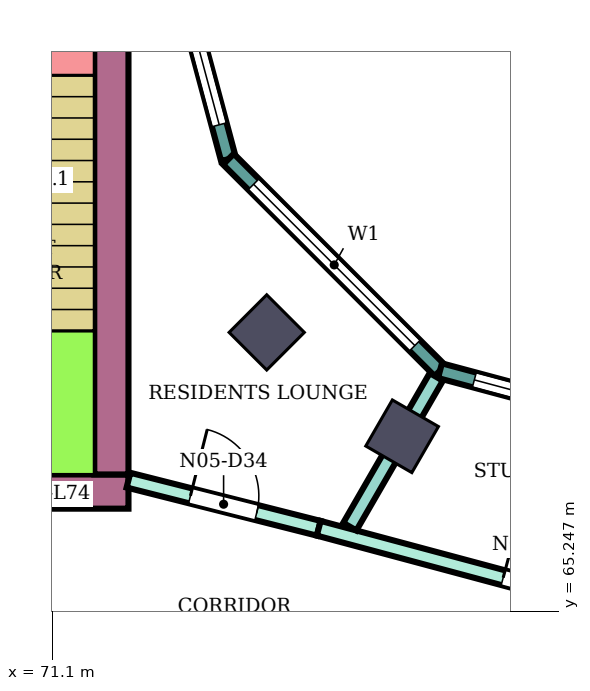
"""IFC4 building model, lengths in metres.
Left out: names, types, materials, properties, quantities, classifications, styles, units other than length and angle.
Written with IfcOpenShell. Run it as: python <this file> out.ifc"""

import sys

from ifc_helpers import new_model, si_unit, direction, frame, frame_2d, origin, origin_2d, place, context, subcontext, project, spatial, rectangle, extrude, element, fill, save


model = new_model("IFC4")
c1 = context("Model", 3, precision=1e-05, world=origin(), true_north=direction((0.0, 1.0)))
c2 = subcontext(c1, "Body", "Model", "MODEL_VIEW")
j1 = project(units=[si_unit("LENGTHUNIT", "METRE"), si_unit("PLANEANGLEUNIT", "RADIAN")], contexts=[c1])
p1 = place(None, origin())
s1 = spatial("IfcSite", under=j1, at=p1, CompositionType="ELEMENT")
p2 = place(p1, origin())
s2 = spatial("IfcBuilding", under=s1, at=p2, CompositionType="ELEMENT")
p3 = place(p2, frame((0.0, 0.0, 323.7)))
s3 = spatial("IfcBuildingStorey", under=s2, at=p3, CompositionType="ELEMENT", Elevation=323.7)
for number, where, z_axis, x_axis in (
    (1, (73.919, 68.919, 0.0), (0.0, 0.0, 1.0), (-0.707, -0.707, 0.0)),
    (2, (75.7, 67.552, 0.0), (0.0, 0.0, 1.0), (-0.5, -0.866, 0.0)),
):
    element("IfcColumn", number, at=place(p3, frame(where, z_axis=z_axis, x_axis=x_axis)), inside=s3, PredefinedType="COLUMN", context=c2, shape_type="SweptSolid", body=[
        extrude(rectangle(XDim=0.7, YDim=0.7, at=origin_2d()), origin(), (0.0, 0.0, 1.0), 4.4),
    ])
p4 = place(p3, frame((72.1, 66.825, 0.0), z_axis=(0.0, 0.0, 1.0), x_axis=(-1.0, 0.0, 0.0)))
e3 = element("IfcWall", 3, at=p4, inside=s3, PredefinedType="SHEAR", context=c2, shape_type="SweptSolid", body=[
    extrude(rectangle(XDim=10.0, YDim=0.45, at=frame_2d((5.0, 0.0))), origin(), (0.0, 0.0, 1.0), 4.05),
])
p5 = place(p4, frame((4.2, 0.0, 0.0)))
e4 = element("IfcOpeningElement", 4, at=p5, cuts=e3, PredefinedType="OPENING", context=c2, shape_type="SweptSolid", body=[
    extrude(rectangle(XDim=2.4, YDim=2.4, at=frame_2d((1.2, 1.2))), frame((0.0, 0.235, 0.0), z_axis=(0.0, -1.0, 0.0), x_axis=(1.0, 0.0, 0.0)), (0.0, 0.0, 1.0), 0.47),
])
p6 = place(p3, frame((71.875, 75.0, 0.0), z_axis=(0.0, 0.0, 1.0), x_axis=(0.0, -1.0, 0.0)))
e5 = element("IfcWall", 5, at=p6, inside=s3, PredefinedType="SHEAR", context=c2, shape_type="SweptSolid", body=[
    extrude(rectangle(XDim=7.95, YDim=0.45, at=frame_2d((3.975, 0.0))), origin(), (0.0, 0.0, 1.0), 4.05),
])
p7 = place(p3, frame((72.396, 75.0, 0.0), z_axis=(0.0, 0.0, 1.0), x_axis=(0.258789828301, -0.965933654434, 0.0)))
e6 = element("IfcWall", 6, at=p7, inside=s3, PredefinedType="NOTDEFINED", context=c2, shape_type="SweptSolid", body=[
    extrude(rectangle(XDim=3.936, YDim=0.2, at=frame_2d((1.968, 0.0))), origin(), (0.0, 0.0, 1.0), 4.4),
])
p8 = place(p7, frame((0.468, 0.0, 0.9)))
e7 = element("IfcOpeningElement", 7, at=p8, cuts=e6, PredefinedType="OPENING", context=c2, shape_type="SweptSolid", body=[
    extrude(rectangle(XDim=3.0, YDim=2.3, at=frame_2d((1.5, 1.15))), frame((0.0, 0.11, 0.0), z_axis=(0.0, -1.0, 0.0), x_axis=(1.0, 0.0, 0.0)), (0.0, 0.0, 1.0), 0.22),
])
p9 = place(p3, frame((73.415, 71.198, 0.0), z_axis=(0.0, 0.0, 1.0), x_axis=(0.707106781187, -0.707106781187, 0.0)))
e8 = element("IfcWall", 8, at=p9, inside=s3, PredefinedType="NOTDEFINED", context=c2, shape_type="SweptSolid", body=[
    extrude(rectangle(XDim=3.936, YDim=0.2, at=frame_2d((1.968, 0.0))), origin(), (0.0, 0.0, 1.0), 4.4),
])
p10 = place(p9, frame((0.468, 0.0, 0.9)))
e9 = element("IfcOpeningElement", 9, at=p10, cuts=e8, PredefinedType="OPENING", context=c2, shape_type="SweptSolid", body=[
    extrude(rectangle(XDim=3.0, YDim=2.3, at=frame_2d((1.5, 1.15))), frame((0.0, 0.11, 0.0), z_axis=(0.0, -1.0, 0.0), x_axis=(1.0, 0.0, 0.0)), (0.0, 0.0, 1.0), 0.22),
])
p11 = place(p3, frame((76.198, 68.415, 0.0), z_axis=(0.0, 0.0, 1.0), x_axis=(0.965933654434, -0.258789828301, 0.0)))
e10 = element("IfcWall", 10, at=p11, inside=s3, PredefinedType="NOTDEFINED", context=c2, shape_type="SweptSolid", body=[
    extrude(rectangle(XDim=3.936, YDim=0.2, at=frame_2d((1.968, 0.0))), origin(), (0.0, 0.0, 1.0), 4.4),
])
p12 = place(p11, frame((0.468, 0.0, 0.9)))
e11 = element("IfcOpeningElement", 11, at=p12, cuts=e10, PredefinedType="OPENING", context=c2, shape_type="SweptSolid", body=[
    extrude(rectangle(XDim=3.0, YDim=2.3, at=frame_2d((1.5, 1.15))), frame((0.0, 0.11, 0.0), z_axis=(0.0, -1.0, 0.0), x_axis=(1.0, 0.0, 0.0)), (0.0, 0.0, 1.0), 0.22),
])
p13 = place(p3, frame((68.201, 65.28, 0.0), z_axis=(0.0, 0.0, 1.0), x_axis=(0.969421088032, -0.245403247897, 0.0)))
e12 = element("IfcWall", 12, at=p13, inside=s3, PredefinedType="PARTITIONING", context=c2, shape_type="SweptSolid", body=[
    extrude(rectangle(XDim=5.927, YDim=0.2, at=frame_2d((2.964, 0.0))), origin(), (0.0, 0.0, 1.0), 3.95),
])
p14 = place(p3, frame((72.1, 66.975, 0.0), z_axis=(0.0, 0.0, 1.0), x_axis=(0.969471314457, -0.245204752086, 0.0)))
e13 = element("IfcWall", 13, at=p14, inside=s3, PredefinedType="PARTITIONING", context=c2, shape_type="SweptSolid", body=[
    extrude(rectangle(XDim=2.582, YDim=0.2, at=frame_2d((1.291, 0.0))), origin(), (0.0, 0.0, 1.0), 3.95),
])
p15 = place(p14, frame((0.841, 0.0, 0.0)))
e14 = element("IfcOpeningElement", 14, at=p15, cuts=e13, PredefinedType="OPENING", context=c2, shape_type="SweptSolid", body=[
    extrude(rectangle(XDim=0.9, YDim=2.1, at=frame_2d((0.45, 1.05))), frame((0.0, 0.11, 0.0), z_axis=(0.0, -1.0, 0.0), x_axis=(1.0, 0.0, 0.0)), (0.0, 0.0, 1.0), 0.22),
])
p16 = place(p3, frame((74.603, 66.342, 0.0), z_axis=(0.0, 0.0, 1.0), x_axis=(0.965920893652, -0.258837453254, 0.0)))
e15 = element("IfcWall", 15, at=p16, inside=s3, PredefinedType="PARTITIONING", context=c2, shape_type="SweptSolid", body=[
    extrude(rectangle(XDim=5.458, YDim=0.2, at=frame_2d((2.729, 0.0))), origin(), (0.0, 0.0, 1.0), 3.95),
])
p17 = place(p16, frame((2.512, 0.0, 0.0)))
e16 = element("IfcOpeningElement", 16, at=p17, cuts=e15, PredefinedType="OPENING", context=c2, shape_type="SweptSolid", body=[
    extrude(rectangle(XDim=0.9, YDim=2.1, at=frame_2d((0.45, 1.05))), frame((0.0, 0.11, 0.0), z_axis=(0.0, -1.0, 0.0), x_axis=(1.0, 0.0, 0.0)), (0.0, 0.0, 1.0), 0.22),
])
p18 = place(p3, frame((75.012, 66.363, 0.0), z_axis=(0.0, 0.0, 1.0), x_axis=(0.500143511652, 0.865942531438, 0.0)))
e17 = element("IfcWall", 17, at=p18, inside=s3, PredefinedType="PARTITIONING", context=c2, shape_type="SweptSolid", body=[
    extrude(rectangle(XDim=2.275, YDim=0.2, at=frame_2d((1.138, 0.0))), origin(), (0.0, 0.0, 1.0), 2.45),
])
p19 = place(p8, origin())
e18 = element("IfcWindow", 18, at=p19, inside=s3, PartitioningType="SINGLE_PANEL", PredefinedType="WINDOW", context=c2, shape_type="SweptSolid", body=[
    extrude(rectangle(XDim=3.0, YDim=2.3, at=frame_2d((1.5, 1.15))), frame((0.0, 0.03, 0.0), z_axis=(0.0, -1.0, 0.0), x_axis=(1.0, 0.0, 0.0)), (0.0, 0.0, 1.0), 0.06),
])
fill(e7, e18)
p20 = place(p10, origin())
e19 = element("IfcWindow", 19, at=p20, inside=s3, PartitioningType="SINGLE_PANEL", PredefinedType="WINDOW", context=c2, shape_type="SweptSolid", body=[
    extrude(rectangle(XDim=3.0, YDim=2.3, at=frame_2d((1.5, 1.15))), frame((0.0, 0.03, 0.0), z_axis=(0.0, -1.0, 0.0), x_axis=(1.0, 0.0, 0.0)), (0.0, 0.0, 1.0), 0.06),
])
fill(e9, e19)
p21 = place(p12, origin())
e20 = element("IfcWindow", 20, at=p21, inside=s3, PartitioningType="SINGLE_PANEL", PredefinedType="WINDOW", context=c2, shape_type="SweptSolid", body=[
    extrude(rectangle(XDim=3.0, YDim=2.3, at=frame_2d((1.5, 1.15))), frame((0.0, 0.03, 0.0), z_axis=(0.0, -1.0, 0.0), x_axis=(1.0, 0.0, 0.0)), (0.0, 0.0, 1.0), 0.06),
])
fill(e11, e20)
p22 = place(p17, origin())
e21 = element("IfcDoor", 21, at=p22, inside=s3, OperationType="SINGLE_SWING_LEFT", PredefinedType="DOOR", context=c2, shape_type="SweptSolid", body=[
    extrude(rectangle(XDim=0.9, YDim=2.1, at=frame_2d((0.45, 1.05))), frame((0.0, 0.025, 0.0), z_axis=(0.0, -1.0, 0.0), x_axis=(1.0, 0.0, 0.0)), (0.0, 0.0, 1.0), 0.05),
])
fill(e16, e21)
p23 = place(p15, origin())
e22 = element("IfcDoor", 22, at=p23, inside=s3, OperationType="SINGLE_SWING_LEFT", PredefinedType="DOOR", context=c2, shape_type="SweptSolid", body=[
    extrude(rectangle(XDim=0.9, YDim=2.1, at=frame_2d((0.45, 1.05))), frame((0.0, 0.025, 0.0), z_axis=(0.0, -1.0, 0.0), x_axis=(1.0, 0.0, 0.0)), (0.0, 0.0, 1.0), 0.05),
])
fill(e14, e22)
save(model, sys.argv[1])
